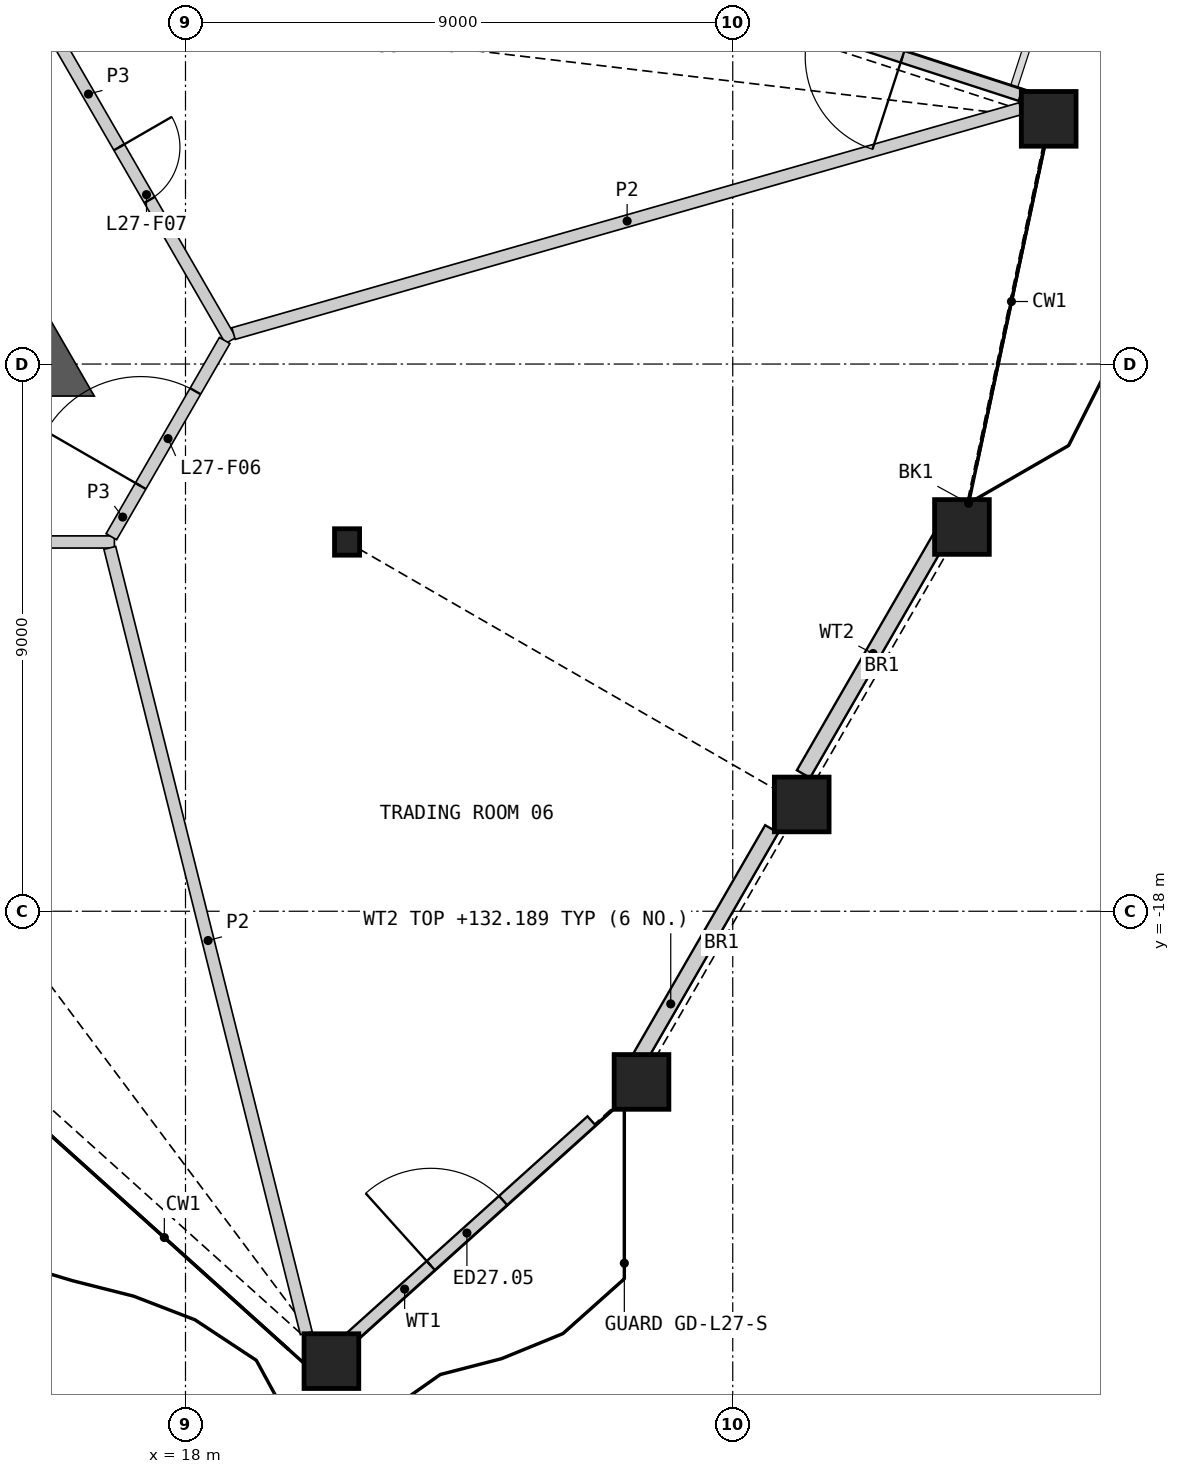
"""IFC4 building model, lengths in metres.
Left out: names, types, materials, properties, quantities, classifications, styles, units other than length and angle.
Written with IfcOpenShell. Run it as: python <this file> out.ifc"""

import sys

from ifc_helpers import new_model, si_unit, direction, frame, frame_2d, origin, origin_2d, place, context, subcontext, project, spatial, polyline, rectangle, hollow_rectangle, i_section, outline, extrude, element, fill, save


model = new_model("IFC4")
c1 = context("Model", 3, precision=1e-05, world=origin(), true_north=direction((0.0, 1.0)))
c2 = subcontext(c1, "Body", "Model", "MODEL_VIEW")
j1 = project(units=[si_unit("LENGTHUNIT", "METRE"), si_unit("PLANEANGLEUNIT", "RADIAN")], contexts=[c1])
p1 = place(None, origin())
s1 = spatial("IfcSite", under=j1, at=p1, CompositionType="ELEMENT")
p2 = place(p1, origin())
s2 = spatial("IfcBuilding", under=s1, at=p2, CompositionType="ELEMENT")
p3 = place(p2, frame((0.0, 0.0, 129.0)))
s3 = spatial("IfcBuildingStorey", under=s2, at=p3, CompositionType="ELEMENT", Elevation=129.0)
for number, where, z_axis, x_axis in (
    (1, (20.4, -25.399, 0.0), (0.0, 0.0, 1.0), (1.0, 0.0, 0.0)),
    (2, (25.5, -20.807, 0.0), (0.0, 0.0, 1.0), (1.0, 0.0, 0.0)),
    (3, (28.135, -16.243, 0.0), (0.0, 0.0, 1.0), (1.0, 0.0, 0.0)),
    (4, (30.769, -11.68, 0.0), (0.0, 0.0, 1.0), (1.0, 0.0, 0.0)),
    (5, (32.196, -4.967, 0.0), (0.0, 0.0, 1.0), (1.0, 0.0, 0.0)),
):
    element("IfcColumn", number, at=place(p3, frame(where, z_axis=z_axis, x_axis=x_axis)), inside=s3, PredefinedType="COLUMN", context=c2, shape_type="SweptSolid", body=[
        extrude(hollow_rectangle(XDim=0.9, YDim=0.9, WallThickness=0.06, at=origin_2d()), origin(), (0.0, 0.0, 1.0), 4.2),
    ])
p4 = place(p3, frame((20.657, -11.926, 0.0), z_axis=(0.0, 0.0, 1.0), x_axis=(1.0, 0.0, 0.0)))
e6 = element("IfcColumn", 6, at=p4, inside=s3, PredefinedType="COLUMN", context=c2, shape_type="SweptSolid", body=[
    extrude(i_section(OverallWidth=0.412, OverallDepth=0.435, WebThickness=0.036, FlangeThickness=0.057, at=origin_2d()), origin(), (0.0, 0.0, 1.0), 4.2),
])
p5 = place(p3, frame((20.579, -25.137, 0.0), z_axis=(0.0, 0.0, 1.0), x_axis=(0.743148838472, 0.66912614945, 0.0)))
e7 = element("IfcWall", 7, at=p5, inside=s3, PredefinedType="SOLIDWALL", context=c2, shape_type="SweptSolid", body=[
    extrude(rectangle(XDim=5.515, YDim=0.2, at=frame_2d((2.757, 0.0))), origin(), (0.0, 0.0, 1.0), 3.189),
])
p6 = place(p5, frame((1.957, 0.0, 0.0)))
e8 = element("IfcOpeningElement", 8, at=p6, cuts=e7, PredefinedType="OPENING", context=c2, shape_type="SweptSolid", body=[
    extrude(rectangle(XDim=1.6, YDim=2.4, at=frame_2d((0.8, 1.2))), frame((0.0, 0.11, 0.0), z_axis=(0.0, -1.0, 0.0), x_axis=(1.0, 0.0, 0.0)), (0.0, 0.0, 1.0), 0.22),
])
p7 = place(p3, frame((25.427, -20.483, 0.0), z_axis=(0.0, 0.0, 1.0), x_axis=(0.499968989506, 0.866043306961, 0.0)))
e9 = element("IfcWall", 9, at=p7, inside=s3, PredefinedType="SOLIDWALL", context=c2, shape_type="SweptSolid", body=[
    extrude(rectangle(XDim=4.429, YDim=0.25, at=frame_2d((2.214, 0.0))), origin(), (0.0, 0.0, 1.0), 3.189),
])
p8 = place(p3, frame((28.163, -15.743, 0.0), z_axis=(0.0, 0.0, 1.0), x_axis=(0.500016357846, 0.866015959371, 0.0)))
e10 = element("IfcWall", 10, at=p8, inside=s3, PredefinedType="SOLIDWALL", context=c2, shape_type="SweptSolid", body=[
    extrude(rectangle(XDim=4.578, YDim=0.25, at=frame_2d((2.289, 0.0))), origin(), (0.0, 0.0, 1.0), 3.189),
])
p9 = place(p3, frame((31.734, -4.577, 0.0), z_axis=(0.0, 0.0, 1.0), x_axis=(-0.951060927669, 0.309003417231, 0.0)))
e11 = element("IfcWall", 11, at=p9, inside=s3, PredefinedType="SOLIDWALL", context=c2, shape_type="SweptSolid", body=[
    extrude(rectangle(XDim=5.877, YDim=0.2, at=frame_2d((2.939, 0.0))), origin(), (0.0, 0.0, 1.0), 3.189),
])
p10 = place(p9, frame((2.042, 0.0, 0.0)))
e12 = element("IfcOpeningElement", 12, at=p10, cuts=e11, PredefinedType="OPENING", context=c2, shape_type="SweptSolid", body=[
    extrude(rectangle(XDim=1.6, YDim=2.4, at=frame_2d((0.8, 1.2))), frame((0.0, 0.11, 0.0), z_axis=(0.0, -1.0, 0.0), x_axis=(1.0, 0.0, 0.0)), (0.0, 0.0, 1.0), 0.22),
])
p11 = place(p3, origin())
e13 = element("IfcWall", 13, at=p11, inside=s3, PredefinedType="SHEAR", context=c2, shape_type="SweptSolid", body=[
    extrude(outline(polyline([(14.941, -8.626), (15.721, -8.176), (16.5, -9.526), (14.941, -9.526), (14.941, -8.626)])), origin(), (0.0, 0.0, 1.0), 3.8),
])
p12 = place(p3, frame((10.556, -11.926, 0.0), z_axis=(0.0, 0.0, 1.0), x_axis=(1.0, 0.0, 0.0)))
e14 = element("IfcWall", 14, at=p12, inside=s3, PredefinedType="PARTITIONING", context=c2, shape_type="SweptSolid", body=[
    extrude(rectangle(XDim=6.275, YDim=0.2, at=frame_2d((3.137, 0.0))), origin(), (0.0, 0.0, 1.0), 3.8),
])
p13 = place(p12, frame((2.587, 0.0, 0.0)))
e15 = element("IfcOpeningElement", 15, at=p13, cuts=e14, PredefinedType="OPENING", context=c2, shape_type="SweptSolid", body=[
    extrude(rectangle(XDim=1.0, YDim=2.1, at=frame_2d((0.5, 1.05))), frame((0.0, 0.11, 0.0), z_axis=(0.0, -1.0, 0.0), x_axis=(1.0, 0.0, 0.0)), (0.0, 0.0, 1.0), 0.22),
])
p14 = place(p3, frame((15.624, -3.209, 0.0), z_axis=(0.0, 0.0, 1.0), x_axis=(0.499997920671, -0.866026604282, 0.0)))
e16 = element("IfcWall", 16, at=p14, inside=s3, PredefinedType="PARTITIONING", context=c2, shape_type="SweptSolid", body=[
    extrude(rectangle(XDim=6.24, YDim=0.2, at=frame_2d((3.12, 0.0))), origin(), (0.0, 0.0, 1.0), 3.8),
])
p15 = place(p14, frame((2.57, 0.0, 0.0)))
e17 = element("IfcOpeningElement", 17, at=p15, cuts=e16, PredefinedType="OPENING", context=c2, shape_type="SweptSolid", body=[
    extrude(rectangle(XDim=1.0, YDim=2.1, at=frame_2d((0.5, 1.05))), frame((0.0, 0.11, 0.0), z_axis=(0.0, -1.0, 0.0), x_axis=(1.0, 0.0, 0.0)), (0.0, 0.0, 1.0), 0.22),
])
p16 = place(p3, frame((16.781, -11.84, 0.0), z_axis=(0.0, 0.0, 1.0), x_axis=(0.499958791762, 0.866049194065, 0.0)))
e18 = element("IfcWall", 18, at=p16, inside=s3, PredefinedType="PARTITIONING", context=c2, shape_type="SweptSolid", body=[
    extrude(rectangle(XDim=3.726, YDim=0.2, at=frame_2d((1.863, 0.0))), origin(), (0.0, 0.0, 1.0), 3.8),
])
p17 = place(p16, frame((0.963, 0.0, 0.0)))
e19 = element("IfcOpeningElement", 19, at=p17, cuts=e18, PredefinedType="OPENING", context=c2, shape_type="SweptSolid", body=[
    extrude(rectangle(XDim=1.8, YDim=2.1, at=frame_2d((0.9, 1.05))), frame((0.0, 0.11, 0.0), z_axis=(0.0, -1.0, 0.0), x_axis=(1.0, 0.0, 0.0)), (0.0, 0.0, 1.0), 0.22),
])
p18 = place(p3, frame((18.79, -8.499, 0.0), z_axis=(0.0, 0.0, 1.0), x_axis=(0.961478776026, 0.274879179372, 0.0)))
e20 = element("IfcWall", 20, at=p18, inside=s3, PredefinedType="PARTITIONING", context=c2, shape_type="SweptSolid", body=[
    extrude(rectangle(XDim=13.465, YDim=0.2, at=frame_2d((6.732, 0.0))), origin(), (0.0, 0.0, 1.0), 2.885),
])
p19 = place(p3, frame((16.755, -12.023, 0.0), z_axis=(0.0, 0.0, 1.0), x_axis=(0.242708204495, -0.97009933897, 0.0)))
e21 = element("IfcWall", 21, at=p19, inside=s3, PredefinedType="PARTITIONING", context=c2, shape_type="SweptSolid", body=[
    extrude(rectangle(XDim=13.314, YDim=0.2, at=frame_2d((6.657, 0.0))), origin(), (0.0, 0.0, 1.0), 2.885),
])
p20 = place(p6, origin())
e22 = element("IfcDoor", 22, at=p20, inside=s3, OperationType="DOUBLE_DOOR_SINGLE_SWING", PredefinedType="DOOR", context=c2, shape_type="SweptSolid", body=[
    extrude(rectangle(XDim=1.6, YDim=2.4, at=frame_2d((0.8, 1.2))), frame((0.0, 0.025, 0.0), z_axis=(0.0, -1.0, 0.0), x_axis=(1.0, 0.0, 0.0)), (0.0, 0.0, 1.0), 0.05),
])
fill(e8, e22)
p21 = place(p10, origin())
e23 = element("IfcDoor", 23, at=p21, inside=s3, OperationType="DOUBLE_DOOR_SINGLE_SWING", PredefinedType="DOOR", context=c2, shape_type="SweptSolid", body=[
    extrude(rectangle(XDim=1.6, YDim=2.4, at=frame_2d((0.8, 1.2))), frame((0.0, 0.025, 0.0), z_axis=(0.0, -1.0, 0.0), x_axis=(1.0, 0.0, 0.0)), (0.0, 0.0, 1.0), 0.05),
])
fill(e12, e23)
p22 = place(p17, origin())
e24 = element("IfcDoor", 24, at=p22, inside=s3, OperationType="DOUBLE_DOOR_SINGLE_SWING", PredefinedType="DOOR", context=c2, shape_type="SweptSolid", body=[
    extrude(rectangle(XDim=1.8, YDim=2.1, at=frame_2d((0.9, 1.05))), frame((0.0, 0.025, 0.0), z_axis=(0.0, -1.0, 0.0), x_axis=(1.0, 0.0, 0.0)), (0.0, 0.0, 1.0), 0.05),
])
fill(e19, e24)
p23 = place(p15, origin())
e25 = element("IfcDoor", 25, at=p23, inside=s3, OperationType="SINGLE_SWING_LEFT", PredefinedType="DOOR", context=c2, shape_type="SweptSolid", body=[
    extrude(rectangle(XDim=1.0, YDim=2.1, at=frame_2d((0.5, 1.05))), frame((0.0, 0.025, 0.0), z_axis=(0.0, -1.0, 0.0), x_axis=(1.0, 0.0, 0.0)), (0.0, 0.0, 1.0), 0.05),
])
fill(e17, e25)
save(model, sys.argv[1])
